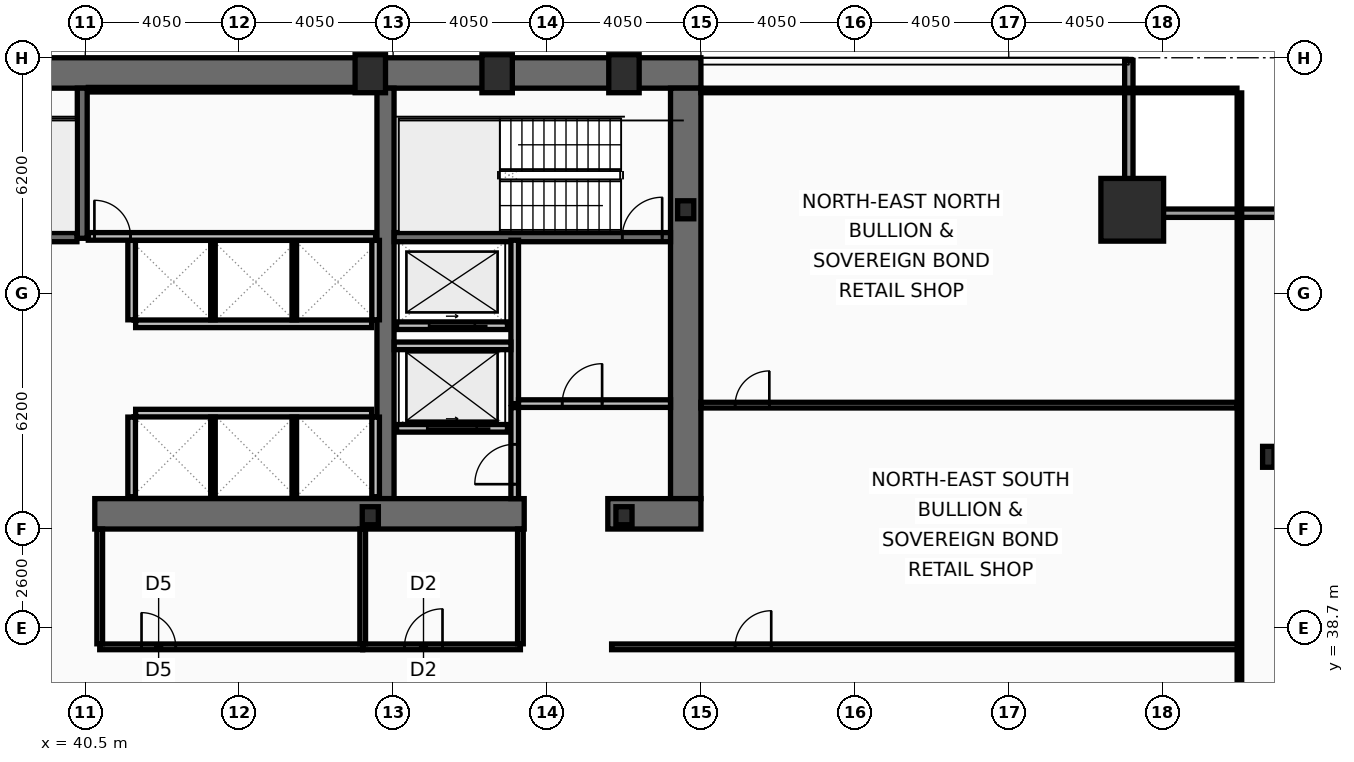
"""IFC4 building model, lengths in metres.
Left out: names, types, materials, properties, quantities, classifications, styles, units other than length and angle.
Written with IfcOpenShell. Run it as: python <this file> out.ifc"""

import sys

from ifc_helpers import new_model, si_unit, direction, frame, frame_2d, origin, origin_2d, place, context, subcontext, project, spatial, rectangle, hollow_rectangle, i_section, extrude, element, fill, save


model = new_model("IFC4")
c1 = context("Model", 3, precision=1e-05, world=origin(), true_north=direction((0.0, 1.0)))
c2 = subcontext(c1, "Body", "Model", "MODEL_VIEW")
j1 = project(units=[si_unit("LENGTHUNIT", "METRE"), si_unit("PLANEANGLEUNIT", "RADIAN")], contexts=[c1])
p1 = place(None, origin())
s1 = spatial("IfcSite", under=j1, at=p1, CompositionType="ELEMENT")
p2 = place(p1, origin())
s2 = spatial("IfcBuilding", under=s1, at=p2, CompositionType="ELEMENT")
p3 = place(p2, frame((0.0, 0.0, 61.8)))
s3 = spatial("IfcBuildingStorey", under=s2, at=p3, CompositionType="ELEMENT", Elevation=61.8)
p4 = place(p3, frame((16.2, 53.3, 0.0), z_axis=(0.0, 0.0, 1.0), x_axis=(1.0, 0.0, 0.0)))
e1 = element("IfcWall", 1, at=p4, inside=s3, PredefinedType="SHEAR", context=c2, shape_type="SweptSolid", body=[
    extrude(rectangle(XDim=40.5, YDim=0.8, at=frame_2d((20.25, 0.0))), origin(), (0.0, 0.0, 1.0), 3.82),
])
p5 = place(p3, frame((56.3, 52.9, 0.0), z_axis=(0.0, 0.0, 1.0), x_axis=(0.0, -1.0, 0.0)))
e2 = element("IfcWall", 2, at=p5, inside=s3, PredefinedType="SHEAR", context=c2, shape_type="SweptSolid", body=[
    extrude(rectangle(XDim=10.8, YDim=0.8, at=frame_2d((5.4, 0.0))), origin(), (0.0, 0.0, 1.0), 3.82),
])
p6 = place(p3, frame((48.4, 42.1, 0.0), z_axis=(0.0, 0.0, 1.0), x_axis=(0.0, 1.0, 0.0)))
e3 = element("IfcWall", 3, at=p6, inside=s3, PredefinedType="SHEAR", context=c2, shape_type="SweptSolid", body=[
    extrude(rectangle(XDim=10.8, YDim=0.45, at=frame_2d((5.4, 0.0))), origin(), (0.0, 0.0, 1.0), 3.82),
])
p7 = place(p3, frame((52.05, 41.7, 0.0), z_axis=(0.0, 0.0, 1.0), x_axis=(-1.0, 0.0, 0.0)))
e4 = element("IfcWall", 4, at=p7, inside=s3, PredefinedType="SHEAR", context=c2, shape_type="SweptSolid", body=[
    extrude(rectangle(XDim=11.3, YDim=0.8, at=frame_2d((5.65, 0.0))), origin(), (0.0, 0.0, 1.0), 3.82),
])
p8 = place(p3, frame((56.7, 41.7, 0.0), z_axis=(0.0, 0.0, 1.0), x_axis=(-1.0, 0.0, 0.0)))
e5 = element("IfcWall", 5, at=p8, inside=s3, PredefinedType="SHEAR", context=c2, shape_type="SweptSolid", body=[
    extrude(rectangle(XDim=2.45, YDim=0.8, at=frame_2d((1.225, 0.0))), origin(), (0.0, 0.0, 1.0), 3.82),
])
p9 = place(p3, frame((40.42, 48.95, 0.0), z_axis=(0.0, 0.0, 1.0), x_axis=(0.0, 1.0, 0.0)))
e6 = element("IfcWall", 6, at=p9, inside=s3, PredefinedType="SHEAR", context=c2, shape_type="SweptSolid", body=[
    extrude(rectangle(XDim=3.95, YDim=0.26, at=frame_2d((1.975, 0.0))), origin(), (0.0, 0.0, 1.0), 3.82),
])
p10 = place(p3, frame((48.63, 48.98, 0.0), z_axis=(0.0, 0.0, 1.0), x_axis=(1.0, 0.0, 0.0)))
e7 = element("IfcWall", 7, at=p10, inside=s3, PredefinedType="SHEAR", context=c2, shape_type="SweptSolid", body=[
    extrude(rectangle(XDim=7.27, YDim=0.24, at=frame_2d((3.635, 0.0))), origin(), (0.0, 0.0, 1.0), 3.82),
])
p11 = place(p10, frame((6.0, 0.0, 0.0)))
e8 = element("IfcOpeningElement", 8, at=p11, cuts=e7, PredefinedType="OPENING", context=c2, shape_type="SweptSolid", body=[
    extrude(rectangle(XDim=1.05, YDim=2.15, at=frame_2d((0.525, 1.075))), frame((0.0, 0.13, 0.0), z_axis=(0.0, -1.0, 0.0), x_axis=(1.0, 0.0, 0.0)), (0.0, 0.0, 1.0), 0.26),
])
p12 = place(p3, frame((32.72, 48.98, 0.0), z_axis=(0.0, 0.0, 1.0), x_axis=(1.0, 0.0, 0.0)))
e9 = element("IfcWall", 9, at=p12, inside=s3, PredefinedType="SHEAR", context=c2, shape_type="SweptSolid", body=[
    extrude(rectangle(XDim=7.56, YDim=0.24, at=frame_2d((3.78, 0.0))), origin(), (0.0, 0.0, 1.0), 3.82),
])
p13 = place(p12, frame((0.22, 0.0, 0.0)))
e10 = element("IfcOpeningElement", 10, at=p13, cuts=e9, PredefinedType="OPENING", context=c2, shape_type="SweptSolid", body=[
    extrude(rectangle(XDim=1.05, YDim=2.15, at=frame_2d((0.525, 1.075))), frame((0.0, 0.13, 0.0), z_axis=(0.0, -1.0, 0.0), x_axis=(1.0, 0.0, 0.0)), (0.0, 0.0, 1.0), 0.26),
])
p14 = place(p3, frame((68.05, 49.7, 0.0), z_axis=(0.0, 0.0, 1.0), x_axis=(1.0, 0.0, 0.0)))
e11 = element("IfcColumn", 11, at=p14, inside=s3, PredefinedType="COLUMN", context=c2, shape_type="SweptSolid", body=[
    extrude(hollow_rectangle(XDim=1.65, YDim=1.65, WallThickness=0.075, at=origin_2d()), origin(), (0.0, 0.0, 1.0), 4.0),
])
for number, where, z_axis, x_axis in (
    (12, (48.0, 53.28, 0.0), (0.0, 0.0, 1.0), (1.0, 0.0, 0.0)),
    (13, (51.337, 53.28, 0.0), (0.0, 0.0, 1.0), (1.0, 0.0, 0.0)),
    (14, (54.675, 53.28, 0.0), (0.0, 0.0, 1.0), (1.0, 0.0, 0.0)),
):
    element("IfcColumn", number, at=place(p3, frame(where, z_axis=z_axis, x_axis=x_axis)), inside=s3, PredefinedType="COLUMN", context=c2, shape_type="SweptSolid", body=[
        extrude(hollow_rectangle(XDim=0.8, YDim=1.0, WallThickness=0.055, at=origin_2d()), origin(), (0.0, 0.0, 1.0), 4.0),
    ])
p15 = place(p3, frame((71.63, 43.2, 0.0), z_axis=(0.0, 0.0, 1.0), x_axis=(1.0, 0.0, 0.0)))
e15 = element("IfcColumn", 15, at=p15, inside=s3, PredefinedType="COLUMN", context=c2, shape_type="SweptSolid", body=[
    extrude(i_section(OverallWidth=0.3, OverallDepth=0.55, WebThickness=0.015, FlangeThickness=0.029, at=origin_2d()), origin(), (0.0, 0.0, 1.0), 4.0),
])
for number, where, z_axis, x_axis in (
    (16, (56.3, 49.7, 0.0), (0.0, 0.0, 1.0), (1.0, 0.0, 0.0)),
    (17, (48.0, 41.65, 0.0), (0.0, 0.0, 1.0), (1.0, 0.0, 0.0)),
    (18, (54.675, 41.65, 0.0), (0.0, 0.0, 1.0), (1.0, 0.0, 0.0)),
):
    element("IfcColumn", number, at=place(p3, frame(where, z_axis=z_axis, x_axis=x_axis)), inside=s3, PredefinedType="COLUMN", context=c2, shape_type="SweptSolid", body=[
        extrude(i_section(OverallWidth=0.424, OverallDepth=0.474, WebThickness=0.048, FlangeThickness=0.077, at=origin_2d()), origin(), (0.0, 0.0, 1.0), 4.0),
    ])
p16 = place(p3, frame((67.96, 53.63, 0.0), z_axis=(0.0, 0.0, 1.0), x_axis=(0.0, -1.0, 0.0)))
e19 = element("IfcWall", 19, at=p16, inside=s3, PredefinedType="SOLIDWALL", context=c2, shape_type="SweptSolid", body=[
    extrude(rectangle(XDim=3.91, YDim=0.22, at=frame_2d((1.955, 0.0))), origin(), (0.0, 0.0, 1.0), 3.16),
])
p17 = place(p3, frame((67.85, 49.61, 0.0), z_axis=(0.0, 0.0, 1.0), x_axis=(1.0, 0.0, 0.0)))
e20 = element("IfcWall", 20, at=p17, inside=s3, PredefinedType="SOLIDWALL", context=c2, shape_type="SweptSolid", body=[
    extrude(rectangle(XDim=4.22, YDim=0.22, at=frame_2d((2.11, 0.0))), origin(), (0.0, 0.0, 1.0), 3.16),
])
p18 = place(p3, frame((51.61, 43.95, 0.0), z_axis=(0.0, 0.0, 1.0), x_axis=(-1.0, 0.0, 0.0)))
e21 = element("IfcWall", 21, at=p18, inside=s3, PredefinedType="PARTITIONING", context=c2, shape_type="SweptSolid", body=[
    extrude(rectangle(XDim=2.92, YDim=0.2, at=frame_2d((1.46, 0.0))), origin(), (0.0, 0.0, 1.0), 3.82),
])
p19 = place(p18, frame((0.81, 0.0, 0.0)))
e22 = element("IfcOpeningElement", 22, at=p19, cuts=e21, PredefinedType="OPENING", context=c2, shape_type="SweptSolid", body=[
    extrude(rectangle(XDim=1.3, YDim=2.18, at=frame_2d((0.65, 1.09))), frame((0.0, 0.11, 0.0), z_axis=(0.0, -1.0, 0.0), x_axis=(1.0, 0.0, 0.0)), (0.0, 0.0, 1.0), 0.22),
])
p20 = place(p3, frame((51.61, 46.65, 0.0), z_axis=(0.0, 0.0, 1.0), x_axis=(-1.0, 0.0, 0.0)))
e23 = element("IfcWall", 23, at=p20, inside=s3, PredefinedType="PARTITIONING", context=c2, shape_type="SweptSolid", body=[
    extrude(rectangle(XDim=2.92, YDim=0.2, at=frame_2d((1.46, 0.0))), origin(), (0.0, 0.0, 1.0), 3.82),
])
p21 = place(p20, frame((0.86, 0.0, 0.0)))
e24 = element("IfcOpeningElement", 24, at=p21, cuts=e23, PredefinedType="OPENING", context=c2, shape_type="SweptSolid", body=[
    extrude(rectangle(XDim=1.2, YDim=2.18, at=frame_2d((0.6, 1.09))), frame((0.0, 0.11, 0.0), z_axis=(0.0, -1.0, 0.0), x_axis=(1.0, 0.0, 0.0)), (0.0, 0.0, 1.0), 0.22),
])
p22 = place(p3, frame((51.8, 44.6, 0.0), z_axis=(0.0, 0.0, 1.0), x_axis=(0.0, 1.0, 0.0)))
e25 = element("IfcWall", 25, at=p22, inside=s3, PredefinedType="PARTITIONING", context=c2, shape_type="SweptSolid", body=[
    extrude(rectangle(XDim=4.3, YDim=0.2, at=frame_2d((2.15, 0.0))), origin(), (0.0, 0.0, 1.0), 3.82),
])
p23 = place(p3, frame((51.9, 44.6, 0.0), z_axis=(0.0, 0.0, 1.0), x_axis=(1.0, 0.0, 0.0)))
e26 = element("IfcWall", 26, at=p23, inside=s3, PredefinedType="PARTITIONING", context=c2, shape_type="SweptSolid", body=[
    extrude(rectangle(XDim=4.0, YDim=0.2, at=frame_2d((2.0, 0.0))), origin(), (0.0, 0.0, 1.0), 3.82),
])
p24 = place(p23, frame((1.15, 0.0, 0.0)))
e27 = element("IfcOpeningElement", 27, at=p24, cuts=e26, PredefinedType="OPENING", context=c2, shape_type="SweptSolid", body=[
    extrude(rectangle(XDim=1.05, YDim=2.15, at=frame_2d((0.525, 1.075))), frame((0.0, 0.11, 0.0), z_axis=(0.0, -1.0, 0.0), x_axis=(1.0, 0.0, 0.0)), (0.0, 0.0, 1.0), 0.22),
])
p25 = place(p3, frame((48.63, 46.12, 0.0), z_axis=(0.0, 0.0, 1.0), x_axis=(1.0, 0.0, 0.0)))
e28 = element("IfcWall", 28, at=p25, inside=s3, PredefinedType="PARTITIONING", context=c2, shape_type="SweptSolid", body=[
    extrude(rectangle(XDim=3.07, YDim=0.2, at=frame_2d((1.535, 0.0))), origin(), (0.0, 0.0, 1.0), 3.82),
])
p26 = place(p3, frame((51.8, 42.1, 0.0), z_axis=(0.0, 0.0, 1.0), x_axis=(0.0, 1.0, 0.0)))
e29 = element("IfcWall", 29, at=p26, inside=s3, PredefinedType="PARTITIONING", context=c2, shape_type="SweptSolid", body=[
    extrude(rectangle(XDim=2.395, YDim=0.2, at=frame_2d((1.198, 0.0))), origin(), (0.0, 0.0, 1.0), 3.82),
])
p27 = place(p26, frame((0.38, 0.0, 0.0)))
e30 = element("IfcOpeningElement", 30, at=p27, cuts=e29, PredefinedType="OPENING", context=c2, shape_type="SweptSolid", body=[
    extrude(rectangle(XDim=1.05, YDim=2.15, at=frame_2d((0.525, 1.075))), frame((0.0, 0.11, 0.0), z_axis=(0.0, -1.0, 0.0), x_axis=(1.0, 0.0, 0.0)), (0.0, 0.0, 1.0), 0.22),
])
p28 = place(p3, frame((41.825, 46.7, 0.0), z_axis=(0.0, 0.0, 1.0), x_axis=(1.0, 0.0, 0.0)))
e31 = element("IfcWall", 31, at=p28, inside=s3, PredefinedType="PARTITIONING", context=c2, shape_type="SweptSolid", body=[
    extrude(rectangle(XDim=6.21, YDim=0.2, at=frame_2d((3.105, 0.0))), origin(), (0.0, 0.0, 1.0), 3.82),
])
for number, where, z_axis, x_axis in (
    (32, (41.72, 46.805, 0.0), (0.0, 0.0, 1.0), (0.0, 1.0, 0.0)),
    (33, (48.14, 46.805, 0.0), (0.0, 0.0, 1.0), (0.0, 1.0, 0.0)),
):
    element("IfcWall", number, at=place(p3, frame(where, z_axis=z_axis, x_axis=x_axis)), inside=s3, PredefinedType="PARTITIONING", context=c2, shape_type="SweptSolid", body=[
        extrude(rectangle(XDim=2.09, YDim=0.2, at=frame_2d((1.045, 0.0))), origin(), (0.0, 0.0, 1.0), 3.82),
    ])
for number, where, z_axis, x_axis in (
    (34, (43.86, 46.805, 0.0), (0.0, 0.0, 1.0), (0.0, 1.0, 0.0)),
    (35, (46.0, 46.805, 0.0), (0.0, 0.0, 1.0), (0.0, 1.0, 0.0)),
):
    element("IfcWall", number, at=place(p3, frame(where, z_axis=z_axis, x_axis=x_axis)), inside=s3, PredefinedType="PARTITIONING", context=c2, shape_type="SweptSolid", body=[
        extrude(rectangle(XDim=2.09, YDim=0.12, at=frame_2d((1.045, 0.0))), origin(), (0.0, 0.0, 1.0), 3.82),
    ])
p29 = place(p3, frame((41.825, 44.35, 0.0), z_axis=(0.0, 0.0, 1.0), x_axis=(1.0, 0.0, 0.0)))
e36 = element("IfcWall", 36, at=p29, inside=s3, PredefinedType="PARTITIONING", context=c2, shape_type="SweptSolid", body=[
    extrude(rectangle(XDim=6.21, YDim=0.2, at=frame_2d((3.105, 0.0))), origin(), (0.0, 0.0, 1.0), 3.82),
])
for number, where, z_axis, x_axis in (
    (37, (41.72, 42.15, 0.0), (0.0, 0.0, 1.0), (0.0, 1.0, 0.0)),
    (38, (48.14, 42.15, 0.0), (0.0, 0.0, 1.0), (0.0, 1.0, 0.0)),
):
    element("IfcWall", number, at=place(p3, frame(where, z_axis=z_axis, x_axis=x_axis)), inside=s3, PredefinedType="PARTITIONING", context=c2, shape_type="SweptSolid", body=[
        extrude(rectangle(XDim=2.095, YDim=0.2, at=frame_2d((1.048, 0.0))), origin(), (0.0, 0.0, 1.0), 3.82),
    ])
for number, where, z_axis, x_axis in (
    (39, (43.86, 42.15, 0.0), (0.0, 0.0, 1.0), (0.0, 1.0, 0.0)),
    (40, (46.0, 42.15, 0.0), (0.0, 0.0, 1.0), (0.0, 1.0, 0.0)),
):
    element("IfcWall", number, at=place(p3, frame(where, z_axis=z_axis, x_axis=x_axis)), inside=s3, PredefinedType="PARTITIONING", context=c2, shape_type="SweptSolid", body=[
        extrude(rectangle(XDim=2.095, YDim=0.12, at=frame_2d((1.048, 0.0))), origin(), (0.0, 0.0, 1.0), 3.82),
    ])
p30 = place(p3, frame((40.58, 52.86, 0.0), z_axis=(0.0, 0.0, 1.0), x_axis=(1.0, 0.0, 0.0)))
e41 = element("IfcWall", 41, at=p30, inside=s3, PredefinedType="PARTITIONING", context=c2, shape_type="SweptSolid", body=[
    extrude(rectangle(XDim=7.56, YDim=0.12, at=frame_2d((3.78, 0.0))), origin(), (0.0, 0.0, 1.0), 3.82),
])
p31 = place(p3, frame((40.58, 49.0, 0.0), z_axis=(0.0, 0.0, 1.0), x_axis=(1.0, 0.0, 0.0)))
e42 = element("IfcWall", 42, at=p31, inside=s3, PredefinedType="PARTITIONING", context=c2, shape_type="SweptSolid", body=[
    extrude(rectangle(XDim=7.56, YDim=0.2, at=frame_2d((3.78, 0.0))), origin(), (0.0, 0.0, 1.0), 3.82),
])
p32 = place(p31, frame((0.16, 0.0, 0.0)))
e43 = element("IfcOpeningElement", 43, at=p32, cuts=e42, PredefinedType="OPENING", context=c2, shape_type="SweptSolid", body=[
    extrude(rectangle(XDim=0.95, YDim=2.1, at=frame_2d((0.475, 1.05))), frame((0.0, 0.11, 0.0), z_axis=(0.0, -1.0, 0.0), x_axis=(1.0, 0.0, 0.0)), (0.0, 0.0, 1.0), 0.22),
])
p33 = place(p3, frame((40.88, 38.2, 0.0), z_axis=(0.0, 0.0, 1.0), x_axis=(1.0, 0.0, 0.0)))
e44 = element("IfcWall", 44, at=p33, inside=s3, PredefinedType="PARTITIONING", context=c2, shape_type="SweptSolid", body=[
    extrude(rectangle(XDim=6.92, YDim=0.15, at=frame_2d((3.46, 0.0))), origin(), (0.0, 0.0, 1.0), 3.01),
])
p34 = place(p33, frame((1.1, 0.0, 0.0)))
e45 = element("IfcOpeningElement", 45, at=p34, cuts=e44, PredefinedType="OPENING", context=c2, shape_type="SweptSolid", body=[
    extrude(rectangle(XDim=0.9, YDim=2.05, at=frame_2d((0.45, 1.025))), frame((0.0, 0.085, 0.0), z_axis=(0.0, -1.0, 0.0), x_axis=(1.0, 0.0, 0.0)), (0.0, 0.0, 1.0), 0.17),
])
p35 = place(p3, frame((47.8, 38.2, 0.0), z_axis=(0.0, 0.0, 1.0), x_axis=(1.0, 0.0, 0.0)))
e46 = element("IfcWall", 46, at=p35, inside=s3, PredefinedType="PARTITIONING", context=c2, shape_type="SweptSolid", body=[
    extrude(rectangle(XDim=4.15, YDim=0.15, at=frame_2d((2.075, 0.0))), origin(), (0.0, 0.0, 1.0), 3.01),
])
p36 = place(p35, frame((1.1, 0.0, 0.0)))
e47 = element("IfcOpeningElement", 47, at=p36, cuts=e46, PredefinedType="OPENING", context=c2, shape_type="SweptSolid", body=[
    extrude(rectangle(XDim=1.0, YDim=2.05, at=frame_2d((0.5, 1.025))), frame((0.0, 0.085, 0.0), z_axis=(0.0, -1.0, 0.0), x_axis=(1.0, 0.0, 0.0)), (0.0, 0.0, 1.0), 0.17),
])
p37 = place(p3, frame((40.88, 38.28, 0.0), z_axis=(0.0, 0.0, 1.0), x_axis=(0.0, 1.0, 0.0)))
e48 = element("IfcWall", 48, at=p37, inside=s3, PredefinedType="PARTITIONING", context=c2, shape_type="SweptSolid", body=[
    extrude(rectangle(XDim=3.02, YDim=0.15, at=frame_2d((1.51, 0.0))), origin(), (0.0, 0.0, 1.0), 3.82),
])
p38 = place(p3, frame((47.8, 38.28, 0.0), z_axis=(0.0, 0.0, 1.0), x_axis=(0.0, 1.0, 0.0)))
e49 = element("IfcWall", 49, at=p38, inside=s3, PredefinedType="PARTITIONING", context=c2, shape_type="SweptSolid", body=[
    extrude(rectangle(XDim=3.02, YDim=0.15, at=frame_2d((1.51, 0.0))), origin(), (0.0, 0.0, 1.0), 3.01),
])
p39 = place(p3, frame((51.95, 38.28, 0.0), z_axis=(0.0, 0.0, 1.0), x_axis=(0.0, 1.0, 0.0)))
e50 = element("IfcWall", 50, at=p39, inside=s3, PredefinedType="PARTITIONING", context=c2, shape_type="SweptSolid", body=[
    extrude(rectangle(XDim=3.02, YDim=0.15, at=frame_2d((1.51, 0.0))), origin(), (0.0, 0.0, 1.0), 3.82),
])
p40 = place(p3, frame((54.35, 38.2, 0.0), z_axis=(0.0, 0.0, 1.0), x_axis=(1.0, 0.0, 0.0)))
e51 = element("IfcWall", 51, at=p40, inside=s3, PredefinedType="PARTITIONING", context=c2, shape_type="SweptSolid", body=[
    extrude(rectangle(XDim=16.52, YDim=0.15, at=frame_2d((8.26, 0.0))), origin(), (0.0, 0.0, 1.0), 3.01),
])
p41 = place(p40, frame((3.25, 0.0, 0.0)))
e52 = element("IfcOpeningElement", 52, at=p41, cuts=e51, PredefinedType="OPENING", context=c2, shape_type="SweptSolid", body=[
    extrude(rectangle(XDim=0.95, YDim=2.05, at=frame_2d((0.475, 1.025))), frame((0.0, 0.085, 0.0), z_axis=(0.0, -1.0, 0.0), x_axis=(1.0, 0.0, 0.0)), (0.0, 0.0, 1.0), 0.17),
])
p42 = place(p3, frame((56.7, 44.56, 0.0), z_axis=(0.0, 0.0, 1.0), x_axis=(1.0, 0.0, 0.0)))
e53 = element("IfcWall", 53, at=p42, inside=s3, PredefinedType="PARTITIONING", context=c2, shape_type="SweptSolid", body=[
    extrude(rectangle(XDim=14.105, YDim=0.15, at=frame_2d((7.052, 0.0))), origin(), (0.0, 0.0, 1.0), 3.16),
])
p43 = place(p42, frame((0.9, 0.0, 0.0)))
e54 = element("IfcOpeningElement", 54, at=p43, cuts=e53, PredefinedType="OPENING", context=c2, shape_type="SweptSolid", body=[
    extrude(rectangle(XDim=0.9, YDim=2.05, at=frame_2d((0.45, 1.025))), frame((0.0, 0.085, 0.0), z_axis=(0.0, -1.0, 0.0), x_axis=(1.0, 0.0, 0.0)), (0.0, 0.0, 1.0), 0.17),
])
p44 = place(p3, frame((70.87, 10.665, 0.0), z_axis=(0.0, 0.0, 1.0), x_axis=(0.0, 1.0, 0.0)))
e55 = element("IfcWall", 55, at=p44, inside=s3, PredefinedType="PARTITIONING", context=c2, shape_type="SweptSolid", body=[
    extrude(rectangle(XDim=42.11, YDim=0.12, at=frame_2d((21.055, 0.0))), origin(), (0.0, 0.0, 1.0), 3.01),
])
p45 = place(p3, frame((56.7, 52.84, 0.0), z_axis=(0.0, 0.0, 1.0), x_axis=(1.0, 0.0, 0.0)))
e56 = element("IfcWall", 56, at=p45, inside=s3, PredefinedType="PARTITIONING", context=c2, shape_type="SweptSolid", body=[
    extrude(rectangle(XDim=14.105, YDim=0.12, at=frame_2d((7.052, 0.0))), origin(), (0.0, 0.0, 1.0), 3.82),
])
p46 = place(p11, origin())
e57 = element("IfcDoor", 57, at=p46, inside=s3, OperationType="SINGLE_SWING_RIGHT", PredefinedType="DOOR", context=c2, shape_type="SweptSolid", body=[
    extrude(rectangle(XDim=1.05, YDim=2.15, at=frame_2d((0.525, 1.075))), frame((0.0, 0.025, 0.0), z_axis=(0.0, -1.0, 0.0), x_axis=(1.0, 0.0, 0.0)), (0.0, 0.0, 1.0), 0.05),
])
fill(e8, e57)
p47 = place(p19, origin())
e58 = element("IfcDoor", 58, at=p47, inside=s3, OperationType="SLIDING_TO_LEFT", PredefinedType="DOOR", context=c2, shape_type="SweptSolid", body=[
    extrude(rectangle(XDim=1.3, YDim=2.18, at=frame_2d((0.65, 1.09))), frame((0.0, 0.025, 0.0), z_axis=(0.0, -1.0, 0.0), x_axis=(1.0, 0.0, 0.0)), (0.0, 0.0, 1.0), 0.05),
])
fill(e22, e58)
p48 = place(p21, origin())
e59 = element("IfcDoor", 59, at=p48, inside=s3, OperationType="SLIDING_TO_LEFT", PredefinedType="DOOR", context=c2, shape_type="SweptSolid", body=[
    extrude(rectangle(XDim=1.2, YDim=2.18, at=frame_2d((0.6, 1.09))), frame((0.0, 0.025, 0.0), z_axis=(0.0, -1.0, 0.0), x_axis=(1.0, 0.0, 0.0)), (0.0, 0.0, 1.0), 0.05),
])
fill(e24, e59)
p49 = place(p24, origin())
e60 = element("IfcDoor", 60, at=p49, inside=s3, OperationType="SINGLE_SWING_RIGHT", PredefinedType="DOOR", context=c2, shape_type="SweptSolid", body=[
    extrude(rectangle(XDim=1.05, YDim=2.15, at=frame_2d((0.525, 1.075))), frame((0.0, 0.025, 0.0), z_axis=(0.0, -1.0, 0.0), x_axis=(1.0, 0.0, 0.0)), (0.0, 0.0, 1.0), 0.05),
])
fill(e27, e60)
p50 = place(p27, origin())
e61 = element("IfcDoor", 61, at=p50, inside=s3, OperationType="SINGLE_SWING_LEFT", PredefinedType="DOOR", context=c2, shape_type="SweptSolid", body=[
    extrude(rectangle(XDim=1.05, YDim=2.15, at=frame_2d((0.525, 1.075))), frame((0.0, 0.025, 0.0), z_axis=(0.0, -1.0, 0.0), x_axis=(1.0, 0.0, 0.0)), (0.0, 0.0, 1.0), 0.05),
])
fill(e30, e61)
p51 = place(p32, origin())
e62 = element("IfcDoor", 62, at=p51, inside=s3, OperationType="SINGLE_SWING_LEFT", PredefinedType="DOOR", context=c2, shape_type="SweptSolid", body=[
    extrude(rectangle(XDim=0.95, YDim=2.1, at=frame_2d((0.475, 1.05))), frame((0.0, 0.025, 0.0), z_axis=(0.0, -1.0, 0.0), x_axis=(1.0, 0.0, 0.0)), (0.0, 0.0, 1.0), 0.05),
])
fill(e43, e62)
p52 = place(p34, origin())
e63 = element("IfcDoor", 63, at=p52, inside=s3, OperationType="SINGLE_SWING_LEFT", PredefinedType="DOOR", context=c2, shape_type="SweptSolid", body=[
    extrude(rectangle(XDim=0.9, YDim=2.05, at=frame_2d((0.45, 1.025))), frame((0.0, 0.025, 0.0), z_axis=(0.0, -1.0, 0.0), x_axis=(1.0, 0.0, 0.0)), (0.0, 0.0, 1.0), 0.05),
])
fill(e45, e63)
p53 = place(p36, origin())
e64 = element("IfcDoor", 64, at=p53, inside=s3, OperationType="SINGLE_SWING_RIGHT", PredefinedType="DOOR", context=c2, shape_type="SweptSolid", body=[
    extrude(rectangle(XDim=1.0, YDim=2.05, at=frame_2d((0.5, 1.025))), frame((0.0, 0.025, 0.0), z_axis=(0.0, -1.0, 0.0), x_axis=(1.0, 0.0, 0.0)), (0.0, 0.0, 1.0), 0.05),
])
fill(e47, e64)
p54 = place(p41, origin())
e65 = element("IfcDoor", 65, at=p54, inside=s3, OperationType="SINGLE_SWING_RIGHT", PredefinedType="DOOR", context=c2, shape_type="SweptSolid", body=[
    extrude(rectangle(XDim=0.95, YDim=2.05, at=frame_2d((0.475, 1.025))), frame((0.0, 0.025, 0.0), z_axis=(0.0, -1.0, 0.0), x_axis=(1.0, 0.0, 0.0)), (0.0, 0.0, 1.0), 0.05),
])
fill(e52, e65)
p55 = place(p43, origin())
e66 = element("IfcDoor", 66, at=p55, inside=s3, OperationType="SINGLE_SWING_RIGHT", PredefinedType="DOOR", context=c2, shape_type="SweptSolid", body=[
    extrude(rectangle(XDim=0.9, YDim=2.05, at=frame_2d((0.45, 1.025))), frame((0.0, 0.025, 0.0), z_axis=(0.0, -1.0, 0.0), x_axis=(1.0, 0.0, 0.0)), (0.0, 0.0, 1.0), 0.05),
])
fill(e54, e66)
save(model, sys.argv[1])
